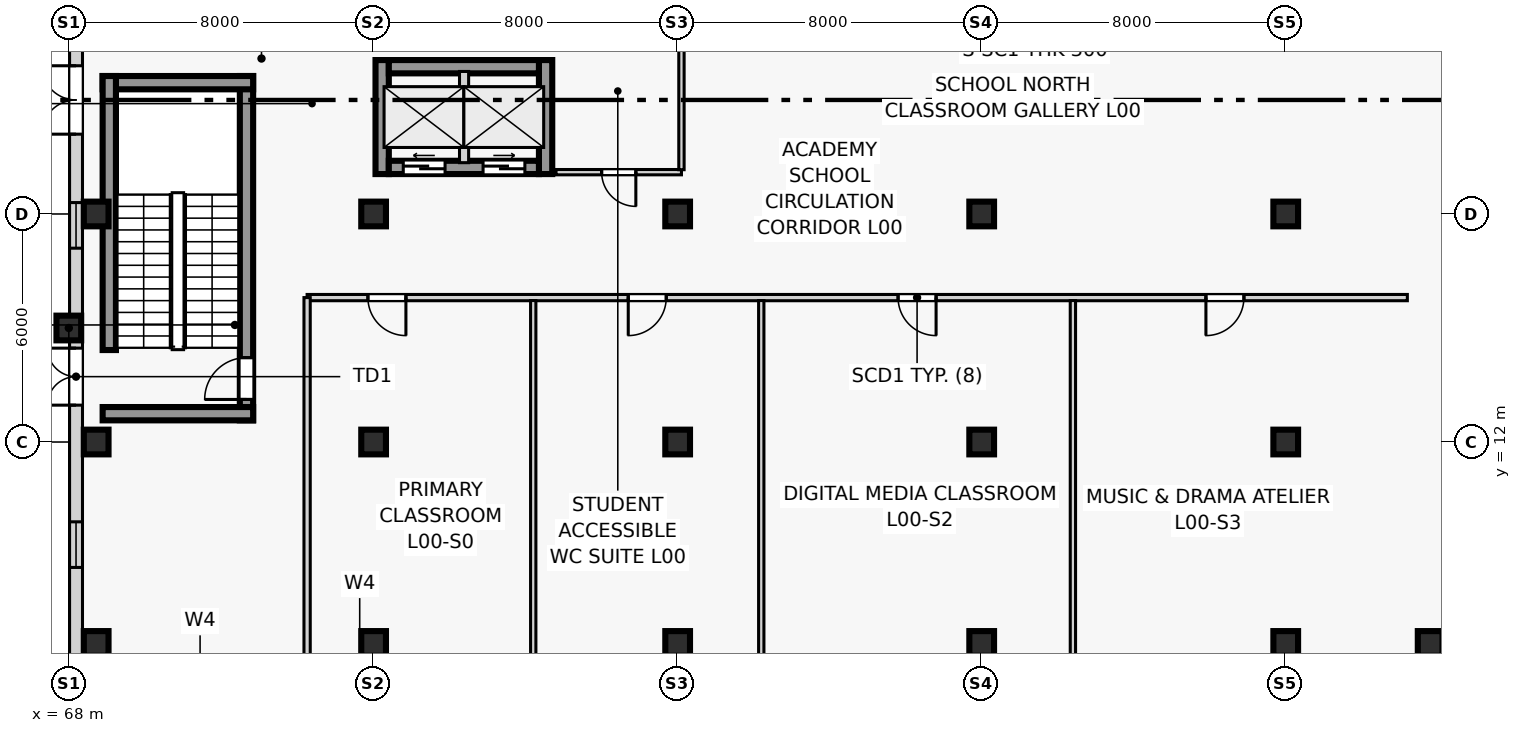
"""IFC4 building model, lengths in metres.
Left out: names, types, materials, properties, quantities, classifications, styles, units other than length and angle.
Written with IfcOpenShell. Run it as: python <this file> out.ifc"""

import sys

from ifc_helpers import new_model, si_unit, direction, frame, frame_2d, origin, origin_2d, place, context, subcontext, project, spatial, rectangle, extrude, source, transform, mapped, element, fill, save


model = new_model("IFC4")
c1 = context("Model", 3, precision=1e-05, world=origin(), true_north=direction((0.0, 1.0)))
c2 = subcontext(c1, "Body", "Model", "MODEL_VIEW")
j1 = project(units=[si_unit("LENGTHUNIT", "METRE"), si_unit("PLANEANGLEUNIT", "RADIAN")], contexts=[c1])
p1 = place(None, origin())
s1 = spatial("IfcSite", under=j1, at=p1, CompositionType="ELEMENT")
p2 = place(p1, origin())
s2 = spatial("IfcBuilding", under=s1, at=p2, CompositionType="ELEMENT")
p3 = place(p2, origin())
s3 = spatial("IfcBuildingStorey", under=s2, at=p3, CompositionType="ELEMENT", Elevation=0.0)
m1 = source(origin(), c2, "Body", "SweptSolid", [
    extrude(rectangle(XDim=0.65, YDim=0.65, at=origin_2d()), origin(), (0.0, 0.0, 1.0), 3.05),
])
p4 = place(p3, frame((67.98, 15.0, 0.0), z_axis=(0.0, 0.0, 1.0), x_axis=(1.0, 0.0, 0.0)))
e1 = element("IfcColumn", 1, at=p4, inside=s3, PredefinedType="COLUMN", context=c2, shape_type="MappedRepresentation", body=[
    mapped(m1, transform((0.0, 0.0, 0.0), scale=1.0)),
])
p5 = place(p3, frame((72.655, 12.57, 0.0), z_axis=(0.0, 0.0, 1.0), x_axis=(0.0, 1.0, 0.0)))
e2 = element("IfcWall", 2, at=p5, inside=s3, PredefinedType="SHEAR", context=c2, shape_type="SweptSolid", body=[
    extrude(rectangle(XDim=9.06, YDim=0.35, at=frame_2d((4.53, 0.0))), origin(), (0.0, 0.0, 1.0), 4.5),
])
p6 = place(p5, frame((0.55, 0.0, 0.0)))
e3 = element("IfcOpeningElement", 3, at=p6, cuts=e2, PredefinedType="OPENING", context=c2, shape_type="SweptSolid", body=[
    extrude(rectangle(XDim=1.1, YDim=2.2, at=frame_2d((0.55, 1.1))), frame((0.0, 0.185, 0.0), z_axis=(0.0, -1.0, 0.0), x_axis=(1.0, 0.0, 0.0)), (0.0, 0.0, 1.0), 0.37),
])
for number, where, z_axis, x_axis in (
    (4, (68.87, 12.745, 0.0), (0.0, 0.0, 1.0), (1.0, 0.0, 0.0)),
    (5, (68.87, 21.455, 0.0), (0.0, 0.0, 1.0), (1.0, 0.0, 0.0)),
):
    element("IfcWall", number, at=place(p3, frame(where, z_axis=z_axis, x_axis=x_axis)), inside=s3, PredefinedType="SHEAR", context=c2, shape_type="SweptSolid", body=[
        extrude(rectangle(XDim=3.96, YDim=0.35, at=frame_2d((1.98, 0.0))), origin(), (0.0, 0.0, 1.0), 4.5),
    ])
p7 = place(p3, frame((69.045, 14.42, 0.0), z_axis=(0.0, 0.0, 1.0), x_axis=(0.0, 1.0, 0.0)))
e6 = element("IfcWall", 6, at=p7, inside=s3, PredefinedType="SHEAR", context=c2, shape_type="SweptSolid", body=[
    extrude(rectangle(XDim=7.21, YDim=0.35, at=frame_2d((3.605, 0.0))), origin(), (0.0, 0.0, 1.0), 4.5),
])
for number, where, z_axis, x_axis in (
    (7, (76.225, 19.05, 0.0), (0.0, 0.0, 1.0), (0.0, 1.0, 0.0)),
    (8, (80.525, 19.05, 0.0), (0.0, 0.0, 1.0), (0.0, 1.0, 0.0)),
):
    element("IfcWall", number, at=place(p3, frame(where, z_axis=z_axis, x_axis=x_axis)), inside=s3, PredefinedType="SHEAR", context=c2, shape_type="SweptSolid", body=[
        extrude(rectangle(XDim=3.0, YDim=0.35, at=frame_2d((1.5, 0.0))), origin(), (0.0, 0.0, 1.0), 4.5),
    ])
p8 = place(p3, frame((76.4, 21.875, 0.0), z_axis=(0.0, 0.0, 1.0), x_axis=(1.0, 0.0, 0.0)))
e9 = element("IfcWall", 9, at=p8, inside=s3, PredefinedType="SHEAR", context=c2, shape_type="SweptSolid", body=[
    extrude(rectangle(XDim=3.95, YDim=0.35, at=frame_2d((1.975, 0.0))), origin(), (0.0, 0.0, 1.0), 4.5),
])
p9 = place(p3, frame((76.4, 19.225, 0.0), z_axis=(0.0, 0.0, 1.0), x_axis=(1.0, 0.0, 0.0)))
e10 = element("IfcWall", 10, at=p9, inside=s3, PredefinedType="SHEAR", context=c2, shape_type="SweptSolid", body=[
    extrude(rectangle(XDim=3.95, YDim=0.35, at=frame_2d((1.975, 0.0))), origin(), (0.0, 0.0, 1.0), 4.5),
])
p10 = place(p9, frame((0.38, 0.0, 0.0)))
e11 = element("IfcOpeningElement", 11, at=p10, cuts=e10, PredefinedType="OPENING", context=c2, shape_type="SweptSolid", body=[
    extrude(rectangle(XDim=1.1, YDim=2.2, at=frame_2d((0.55, 1.1))), frame((0.0, 0.185, 0.0), z_axis=(0.0, -1.0, 0.0), x_axis=(1.0, 0.0, 0.0)), (0.0, 0.0, 1.0), 0.37),
])
p11 = place(p9, frame((2.48, 0.0, 0.0)))
e12 = element("IfcOpeningElement", 12, at=p11, cuts=e10, PredefinedType="OPENING", context=c2, shape_type="SweptSolid", body=[
    extrude(rectangle(XDim=1.1, YDim=2.2, at=frame_2d((0.55, 1.1))), frame((0.0, 0.185, 0.0), z_axis=(0.0, -1.0, 0.0), x_axis=(1.0, 0.0, 0.0)), (0.0, 0.0, 1.0), 0.37),
])
m2 = source(origin(), c2, "Body", "SweptSolid", [
    extrude(rectangle(XDim=0.65, YDim=0.65, at=origin_2d()), origin(), (0.0, 0.0, 1.0), 4.5),
])
for number, where, z_axis, x_axis in (
    (13, (68.7, 6.7, 0.0), (0.0, 0.0, 1.0), (1.0, 0.0, 0.0)),
    (14, (68.7, 12.0, 0.0), (0.0, 0.0, 1.0), (1.0, 0.0, 0.0)),
    (15, (68.7, 18.0, 0.0), (0.0, 0.0, 1.0), (1.0, 0.0, 0.0)),
    (16, (76.0, 6.7, 0.0), (0.0, 0.0, 1.0), (1.0, 0.0, 0.0)),
    (17, (76.0, 12.0, 0.0), (0.0, 0.0, 1.0), (1.0, 0.0, 0.0)),
    (18, (76.0, 18.0, 0.0), (0.0, 0.0, 1.0), (1.0, 0.0, 0.0)),
    (19, (84.0, 6.7, 0.0), (0.0, 0.0, 1.0), (1.0, 0.0, 0.0)),
    (20, (84.0, 12.0, 0.0), (0.0, 0.0, 1.0), (1.0, 0.0, 0.0)),
    (21, (84.0, 18.0, 0.0), (0.0, 0.0, 1.0), (1.0, 0.0, 0.0)),
    (22, (92.0, 6.7, 0.0), (0.0, 0.0, 1.0), (1.0, 0.0, 0.0)),
    (23, (92.0, 12.0, 0.0), (0.0, 0.0, 1.0), (1.0, 0.0, 0.0)),
    (24, (92.0, 18.0, 0.0), (0.0, 0.0, 1.0), (1.0, 0.0, 0.0)),
    (25, (100.0, 6.7, 0.0), (0.0, 0.0, 1.0), (1.0, 0.0, 0.0)),
    (26, (100.0, 12.0, 0.0), (0.0, 0.0, 1.0), (1.0, 0.0, 0.0)),
    (27, (100.0, 18.0, 0.0), (0.0, 0.0, 1.0), (1.0, 0.0, 0.0)),
    (28, (103.8, 6.7, 0.0), (0.0, 0.0, 1.0), (1.0, 0.0, 0.0)),
):
    element("IfcColumn", number, at=place(p3, frame(where, z_axis=z_axis, x_axis=x_axis)), inside=s3, PredefinedType="COLUMN", context=c2, shape_type="MappedRepresentation", body=[
        mapped(m2, transform((0.0, 0.0, 0.0), scale=1.0)),
    ])
p12 = place(p3, frame((103.93, 6.17, 0.0), z_axis=(0.0, 0.0, 1.0), x_axis=(0.707106781187, 0.707106781187, 0.0)))
e29 = element("IfcWall", 29, at=p12, inside=s3, PredefinedType="SOLIDWALL", context=c2, shape_type="SweptSolid", body=[
    extrude(rectangle(XDim=5.516, YDim=0.34, at=frame_2d((2.758, 0.0))), origin(), (0.0, 0.0, 1.0), 3.45),
])
p13 = place(p12, frame((2.158, 0.0, 0.95)))
e30 = element("IfcOpeningElement", 30, at=p13, cuts=e29, PredefinedType="OPENING", context=c2, shape_type="SweptSolid", body=[
    extrude(rectangle(XDim=1.2, YDim=1.5, at=frame_2d((0.6, 0.75))), frame((0.0, 0.18, 0.0), z_axis=(0.0, -1.0, 0.0), x_axis=(1.0, 0.0, 0.0)), (0.0, 0.0, 1.0), 0.36),
])
p14 = place(p3, frame((68.17, 41.83, 0.0), z_axis=(0.0, 0.0, 1.0), x_axis=(0.0, -1.0, 0.0)))
e31 = element("IfcWall", 31, at=p14, inside=s3, PredefinedType="SOLIDWALL", context=c2, shape_type="SweptSolid", body=[
    extrude(rectangle(XDim=35.66, YDim=0.34, at=frame_2d((17.83, 0.0))), origin(), (0.0, 0.0, 1.0), 4.2),
])
p15 = place(p14, frame((2.53, 0.0, 0.95)))
e32 = element("IfcOpeningElement", 32, at=p15, cuts=e31, PredefinedType="OPENING", context=c2, shape_type="SweptSolid", body=[
    extrude(rectangle(XDim=1.2, YDim=1.5, at=frame_2d((0.6, 0.75))), frame((0.0, 0.18, 0.0), z_axis=(0.0, -1.0, 0.0), x_axis=(1.0, 0.0, 0.0)), (0.0, 0.0, 1.0), 0.36),
])
p16 = place(p14, frame((6.73, 0.0, 0.95)))
e33 = element("IfcOpeningElement", 33, at=p16, cuts=e31, PredefinedType="OPENING", context=c2, shape_type="SweptSolid", body=[
    extrude(rectangle(XDim=1.2, YDim=1.5, at=frame_2d((0.6, 0.75))), frame((0.0, 0.18, 0.0), z_axis=(0.0, -1.0, 0.0), x_axis=(1.0, 0.0, 0.0)), (0.0, 0.0, 1.0), 0.36),
])
p17 = place(p14, frame((10.93, 0.0, 0.95)))
e34 = element("IfcOpeningElement", 34, at=p17, cuts=e31, PredefinedType="OPENING", context=c2, shape_type="SweptSolid", body=[
    extrude(rectangle(XDim=1.2, YDim=1.5, at=frame_2d((0.6, 0.75))), frame((0.0, 0.18, 0.0), z_axis=(0.0, -1.0, 0.0), x_axis=(1.0, 0.0, 0.0)), (0.0, 0.0, 1.0), 0.36),
])
p18 = place(p14, frame((15.13, 0.0, 0.95)))
e35 = element("IfcOpeningElement", 35, at=p18, cuts=e31, PredefinedType="OPENING", context=c2, shape_type="SweptSolid", body=[
    extrude(rectangle(XDim=1.2, YDim=1.5, at=frame_2d((0.6, 0.75))), frame((0.0, 0.18, 0.0), z_axis=(0.0, -1.0, 0.0), x_axis=(1.0, 0.0, 0.0)), (0.0, 0.0, 1.0), 0.36),
])
p19 = place(p14, frame((23.53, 0.0, 0.95)))
e36 = element("IfcOpeningElement", 36, at=p19, cuts=e31, PredefinedType="OPENING", context=c2, shape_type="SweptSolid", body=[
    extrude(rectangle(XDim=1.2, YDim=1.5, at=frame_2d((0.6, 0.75))), frame((0.0, 0.18, 0.0), z_axis=(0.0, -1.0, 0.0), x_axis=(1.0, 0.0, 0.0)), (0.0, 0.0, 1.0), 0.36),
])
p20 = place(p14, frame((31.93, 0.0, 0.95)))
e37 = element("IfcOpeningElement", 37, at=p20, cuts=e31, PredefinedType="OPENING", context=c2, shape_type="SweptSolid", body=[
    extrude(rectangle(XDim=1.2, YDim=1.5, at=frame_2d((0.6, 0.75))), frame((0.0, 0.18, 0.0), z_axis=(0.0, -1.0, 0.0), x_axis=(1.0, 0.0, 0.0)), (0.0, 0.0, 1.0), 0.36),
])
p21 = place(p14, frame((19.93, 0.0, 0.0)))
e38 = element("IfcOpeningElement", 38, at=p21, cuts=e31, PredefinedType="OPENING", context=c2, shape_type="SweptSolid", body=[
    extrude(rectangle(XDim=1.8, YDim=2.4, at=frame_2d((0.9, 1.2))), frame((0.0, 0.18, 0.0), z_axis=(0.0, -1.0, 0.0), x_axis=(1.0, 0.0, 0.0)), (0.0, 0.0, 1.0), 0.36),
])
p22 = place(p14, frame((27.36, 0.0, 0.0)))
e39 = element("IfcOpeningElement", 39, at=p22, cuts=e31, PredefinedType="OPENING", context=c2, shape_type="SweptSolid", body=[
    extrude(rectangle(XDim=1.5, YDim=2.3, at=frame_2d((0.75, 1.15))), frame((0.0, 0.18, 0.0), z_axis=(0.0, -1.0, 0.0), x_axis=(1.0, 0.0, 0.0)), (0.0, 0.0, 1.0), 0.36),
])
p23 = place(p3, frame((78.38, 19.35, 0.0), z_axis=(0.0, 0.0, 1.0), x_axis=(0.0, 1.0, 0.0)))
e40 = element("IfcWall", 40, at=p23, inside=s3, PredefinedType="PARTITIONING", context=c2, shape_type="SweptSolid", body=[
    extrude(rectangle(XDim=2.4, YDim=0.24, at=frame_2d((1.2, 0.0))), origin(), (0.0, 0.0, 1.0), 4.2),
])
p24 = place(p3, frame((74.25, 15.8, 0.0), z_axis=(0.0, 0.0, 1.0), x_axis=(1.0, 0.0, 0.0)))
e41 = element("IfcWall", 41, at=p24, inside=s3, PredefinedType="PARTITIONING", context=c2, shape_type="SweptSolid", body=[
    extrude(rectangle(XDim=28.95, YDim=0.165, at=frame_2d((14.475, 0.0))), origin(), (0.0, 0.0, 1.0), 4.2),
])
p25 = place(p24, frame((1.6, 0.0, 0.0)))
e42 = element("IfcOpeningElement", 42, at=p25, cuts=e41, PredefinedType="OPENING", context=c2, shape_type="SweptSolid", body=[
    extrude(rectangle(XDim=1.0, YDim=2.15, at=frame_2d((0.5, 1.075))), frame((0.0, 0.093, 0.0), z_axis=(0.0, -1.0, 0.0), x_axis=(1.0, 0.0, 0.0)), (0.0, 0.0, 1.0), 0.185),
])
p26 = place(p24, frame((8.45, 0.0, 0.0)))
e43 = element("IfcOpeningElement", 43, at=p26, cuts=e41, PredefinedType="OPENING", context=c2, shape_type="SweptSolid", body=[
    extrude(rectangle(XDim=1.0, YDim=2.15, at=frame_2d((0.5, 1.075))), frame((0.0, 0.093, 0.0), z_axis=(0.0, -1.0, 0.0), x_axis=(1.0, 0.0, 0.0)), (0.0, 0.0, 1.0), 0.185),
])
p27 = place(p24, frame((15.55, 0.0, 0.0)))
e44 = element("IfcOpeningElement", 44, at=p27, cuts=e41, PredefinedType="OPENING", context=c2, shape_type="SweptSolid", body=[
    extrude(rectangle(XDim=1.0, YDim=2.15, at=frame_2d((0.5, 1.075))), frame((0.0, 0.093, 0.0), z_axis=(0.0, -1.0, 0.0), x_axis=(1.0, 0.0, 0.0)), (0.0, 0.0, 1.0), 0.185),
])
p28 = place(p24, frame((23.65, 0.0, 0.0)))
e45 = element("IfcOpeningElement", 45, at=p28, cuts=e41, PredefinedType="OPENING", context=c2, shape_type="SweptSolid", body=[
    extrude(rectangle(XDim=1.0, YDim=2.15, at=frame_2d((0.5, 1.075))), frame((0.0, 0.093, 0.0), z_axis=(0.0, -1.0, 0.0), x_axis=(1.0, 0.0, 0.0)), (0.0, 0.0, 1.0), 0.185),
])
p29 = place(p3, frame((80.8, 19.1, 0.0), z_axis=(0.0, 0.0, 1.0), x_axis=(1.0, 0.0, 0.0)))
e46 = element("IfcWall", 46, at=p29, inside=s3, PredefinedType="PLUMBINGWALL", context=c2, shape_type="SweptSolid", body=[
    extrude(rectangle(XDim=3.3, YDim=0.14, at=frame_2d((1.65, 0.0))), origin(), (0.0, 0.0, 1.0), 4.2),
])
p30 = place(p29, frame((1.2, 0.0, 0.0)))
e47 = element("IfcOpeningElement", 47, at=p30, cuts=e46, PredefinedType="OPENING", context=c2, shape_type="SweptSolid", body=[
    extrude(rectangle(XDim=0.9, YDim=2.1, at=frame_2d((0.45, 1.05))), frame((0.0, 0.08, 0.0), z_axis=(0.0, -1.0, 0.0), x_axis=(1.0, 0.0, 0.0)), (0.0, 0.0, 1.0), 0.16),
])
p31 = place(p3, frame((84.1, 19.165, 0.0), z_axis=(0.0, 0.0, 1.0), x_axis=(0.0, 1.0, 0.0)))
e48 = element("IfcWall", 48, at=p31, inside=s3, PredefinedType="PLUMBINGWALL", context=c2, shape_type="SweptSolid", body=[
    extrude(rectangle(XDim=3.958, YDim=0.14, at=frame_2d((1.979, 0.0))), origin(), (0.0, 0.0, 1.0), 3.45),
])
for number, where, z_axis, x_axis in (
    (49, (80.2, 6.185, 0.0), (0.0, 0.0, 1.0), (0.0, 1.0, 0.0)),
    (50, (86.2, 6.185, 0.0), (0.0, 0.0, 1.0), (0.0, 1.0, 0.0)),
    (51, (94.4, 6.185, 0.0), (0.0, 0.0, 1.0), (0.0, 1.0, 0.0)),
):
    element("IfcWall", number, at=place(p3, frame(where, z_axis=z_axis, x_axis=x_axis)), inside=s3, PredefinedType="PARTITIONING", context=c2, shape_type="SweptSolid", body=[
        extrude(rectangle(XDim=9.537, YDim=0.14, at=frame_2d((4.769, 0.0))), origin(), (0.0, 0.0, 1.0), 4.2),
    ])
p32 = place(p3, frame((74.25, 6.185, 0.0), z_axis=(0.0, 0.0, 1.0), x_axis=(0.0, 1.0, 0.0)))
e52 = element("IfcWall", 52, at=p32, inside=s3, PredefinedType="PARTITIONING", context=c2, shape_type="SweptSolid", body=[
    extrude(rectangle(XDim=9.615, YDim=0.165, at=frame_2d((4.808, 0.0))), origin(), (0.0, 0.0, 1.0), 4.2),
])
m3 = source(origin(), c2, "Body", "SweptSolid", [
    extrude(rectangle(XDim=1.2, YDim=1.5, at=frame_2d((0.6, 0.75))), frame((0.0, 0.03, 0.0), z_axis=(0.0, -1.0, 0.0), x_axis=(1.0, 0.0, 0.0)), (0.0, 0.0, 1.0), 0.06),
])
p33 = place(p19, origin())
e53 = element("IfcWindow", 53, at=p33, inside=s3, PartitioningType="SINGLE_PANEL", PredefinedType="WINDOW", context=c2, shape_type="MappedRepresentation", body=[
    mapped(m3, transform((0.0, 0.0, 0.0), scale=1.0)),
])
fill(e36, e53)
p34 = place(p20, origin())
e54 = element("IfcWindow", 54, at=p34, inside=s3, PartitioningType="SINGLE_PANEL", PredefinedType="WINDOW", context=c2, shape_type="MappedRepresentation", body=[
    mapped(m3, transform((0.0, 0.0, 0.0), scale=1.0)),
])
fill(e37, e54)
m4 = source(origin(), c2, "Body", "SweptSolid", [
    extrude(rectangle(XDim=1.8, YDim=2.4, at=frame_2d((0.9, 1.2))), frame((0.0, 0.025, 0.0), z_axis=(0.0, -1.0, 0.0), x_axis=(1.0, 0.0, 0.0)), (0.0, 0.0, 1.0), 0.05),
])
p35 = place(p21, frame((1.8, 0.0, 0.0), z_axis=(0.0, 0.0, 1.0), x_axis=(-1.0, 0.0, 0.0)))
e55 = element("IfcDoor", 55, at=p35, inside=s3, OperationType="DOUBLE_DOOR_SINGLE_SWING", PredefinedType="DOOR", context=c2, shape_type="MappedRepresentation", body=[
    mapped(m4, transform((0.0, 0.0, 0.0), scale=1.0)),
])
fill(e38, e55)
m5 = source(origin(), c2, "Body", "SweptSolid", [
    extrude(rectangle(XDim=1.5, YDim=2.3, at=frame_2d((0.75, 1.15))), frame((0.0, 0.025, 0.0), z_axis=(0.0, -1.0, 0.0), x_axis=(1.0, 0.0, 0.0)), (0.0, 0.0, 1.0), 0.05),
])
p36 = place(p22, frame((1.5, 0.0, 0.0), z_axis=(0.0, 0.0, 1.0), x_axis=(-1.0, 0.0, 0.0)))
e56 = element("IfcDoor", 56, at=p36, inside=s3, OperationType="DOUBLE_DOOR_SINGLE_SWING", PredefinedType="DOOR", context=c2, shape_type="MappedRepresentation", body=[
    mapped(m5, transform((0.0, 0.0, 0.0), scale=1.0)),
])
fill(e39, e56)
m6 = source(origin(), c2, "Body", "SweptSolid", [
    extrude(rectangle(XDim=1.1, YDim=2.2, at=frame_2d((0.55, 1.1))), frame((0.0, 0.025, 0.0), z_axis=(0.0, -1.0, 0.0), x_axis=(1.0, 0.0, 0.0)), (0.0, 0.0, 1.0), 0.05),
])
p37 = place(p6, origin())
e57 = element("IfcDoor", 57, at=p37, inside=s3, OperationType="SINGLE_SWING_LEFT", PredefinedType="DOOR", context=c2, shape_type="MappedRepresentation", body=[
    mapped(m6, transform((0.0, 0.0, 0.0), scale=1.0)),
])
fill(e3, e57)
m7 = source(origin(), c2, "Body", "SweptSolid", [
    extrude(rectangle(XDim=1.1, YDim=2.2, at=frame_2d((0.55, 1.1))), frame((0.0, 0.025, 0.0), z_axis=(0.0, -1.0, 0.0), x_axis=(1.0, 0.0, 0.0)), (0.0, 0.0, 1.0), 0.05),
])
p38 = place(p10, origin())
e58 = element("IfcDoor", 58, at=p38, inside=s3, OperationType="SLIDING_TO_LEFT", PredefinedType="DOOR", context=c2, shape_type="MappedRepresentation", body=[
    mapped(m7, transform((0.0, 0.0, 0.0), scale=1.0)),
])
fill(e11, e58)
p39 = place(p11, origin())
e59 = element("IfcDoor", 59, at=p39, inside=s3, OperationType="SLIDING_TO_RIGHT", PredefinedType="DOOR", context=c2, shape_type="MappedRepresentation", body=[
    mapped(m7, transform((0.0, 0.0, 0.0), scale=1.0)),
])
fill(e12, e59)
m8 = source(origin(), c2, "Body", "SweptSolid", [
    extrude(rectangle(XDim=0.9, YDim=2.1, at=frame_2d((0.45, 1.05))), frame((0.0, 0.025, 0.0), z_axis=(0.0, -1.0, 0.0), x_axis=(1.0, 0.0, 0.0)), (0.0, 0.0, 1.0), 0.05),
])
p40 = place(p30, frame((0.9, 0.0, 0.0), z_axis=(0.0, 0.0, 1.0), x_axis=(-1.0, 0.0, 0.0)))
e60 = element("IfcDoor", 60, at=p40, inside=s3, OperationType="SINGLE_SWING_LEFT", PredefinedType="DOOR", context=c2, shape_type="MappedRepresentation", body=[
    mapped(m8, transform((0.0, 0.0, 0.0), scale=1.0)),
])
fill(e47, e60)
m9 = source(origin(), c2, "Body", "SweptSolid", [
    extrude(rectangle(XDim=1.0, YDim=2.15, at=frame_2d((0.5, 1.075))), frame((0.0, 0.025, 0.0), z_axis=(0.0, -1.0, 0.0), x_axis=(1.0, 0.0, 0.0)), (0.0, 0.0, 1.0), 0.05),
])
p41 = place(p25, frame((1.0, 0.0, 0.0), z_axis=(0.0, 0.0, 1.0), x_axis=(-1.0, 0.0, 0.0)))
e61 = element("IfcDoor", 61, at=p41, inside=s3, OperationType="SINGLE_SWING_LEFT", PredefinedType="DOOR", context=c2, shape_type="MappedRepresentation", body=[
    mapped(m9, transform((0.0, 0.0, 0.0), scale=1.0)),
])
fill(e42, e61)
p42 = place(p26, frame((1.0, 0.0, 0.0), z_axis=(0.0, 0.0, 1.0), x_axis=(-1.0, 0.0, 0.0)))
e62 = element("IfcDoor", 62, at=p42, inside=s3, OperationType="SINGLE_SWING_RIGHT", PredefinedType="DOOR", context=c2, shape_type="MappedRepresentation", body=[
    mapped(m9, transform((0.0, 0.0, 0.0), scale=1.0)),
])
fill(e43, e62)
p43 = place(p27, frame((1.0, 0.0, 0.0), z_axis=(0.0, 0.0, 1.0), x_axis=(-1.0, 0.0, 0.0)))
e63 = element("IfcDoor", 63, at=p43, inside=s3, OperationType="SINGLE_SWING_LEFT", PredefinedType="DOOR", context=c2, shape_type="MappedRepresentation", body=[
    mapped(m9, transform((0.0, 0.0, 0.0), scale=1.0)),
])
fill(e44, e63)
p44 = place(p28, frame((1.0, 0.0, 0.0), z_axis=(0.0, 0.0, 1.0), x_axis=(-1.0, 0.0, 0.0)))
e64 = element("IfcDoor", 64, at=p44, inside=s3, OperationType="SINGLE_SWING_RIGHT", PredefinedType="DOOR", context=c2, shape_type="MappedRepresentation", body=[
    mapped(m9, transform((0.0, 0.0, 0.0), scale=1.0)),
])
fill(e45, e64)
save(model, sys.argv[1])
